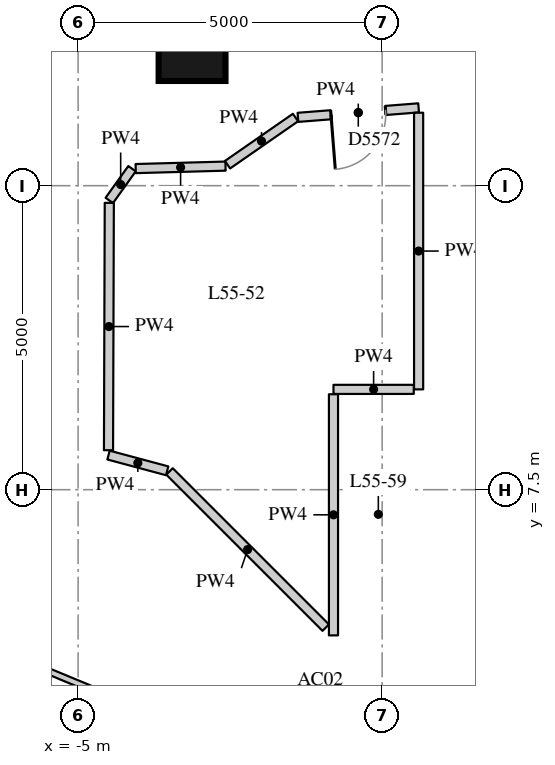
"""IFC4 building model, lengths in metres.
Left out: names, types, materials, properties, quantities, classifications, styles, units other than length and angle.
Written with IfcOpenShell. Run it as: python <this file> out.ifc"""

import sys

from ifc_helpers import new_model, si_unit, direction, frame, frame_2d, origin, origin_2d, place, context, subcontext, project, spatial, rectangle, extrude, element, fill, save


model = new_model("IFC4")
c1 = context("Model", 3, precision=1e-05, world=origin(), true_north=direction((0.0, 1.0)))
c2 = subcontext(c1, "Body", "Model", "MODEL_VIEW")
j1 = project(units=[si_unit("LENGTHUNIT", "METRE"), si_unit("PLANEANGLEUNIT", "RADIAN")], contexts=[c1])
p1 = place(None, origin())
s1 = spatial("IfcSite", under=j1, at=p1, CompositionType="ELEMENT")
p2 = place(p1, origin())
s2 = spatial("IfcBuilding", under=s1, at=p2, CompositionType="ELEMENT")
p3 = place(p2, frame((0.0, 0.0, 195.8)))
s3 = spatial("IfcBuildingStorey", under=s2, at=p3, CompositionType="ELEMENT", Elevation=195.8)
p4 = place(p3, frame((-3.126, 14.772, 0.0), z_axis=(0.0, 0.0, 1.0), x_axis=(1.0, 0.0, 0.0)))
e1 = element("IfcColumn", 1, at=p4, inside=s3, PredefinedType="COLUMN", context=c2, shape_type="SweptSolid", body=[
    extrude(rectangle(XDim=1.1, YDim=1.1, at=origin_2d()), origin(), (0.0, 0.0, 1.0), 3.3),
])
p5 = place(p3, frame((-4.487, 12.258, 0.0), z_axis=(0.0, 0.0, 1.0), x_axis=(0.582280364551, 0.812988054684, 0.0)))
e2 = element("IfcWall", 2, at=p5, inside=s3, PredefinedType="PARTITIONING", context=c2, shape_type="SweptSolid", body=[
    extrude(rectangle(XDim=0.642, YDim=0.15, at=frame_2d((0.321, 0.0))), origin(), (0.0, 0.0, 1.0), 3.02),
])
p6 = place(p3, frame((-4.053, 12.781, 0.0), z_axis=(0.0, 0.0, 1.0), x_axis=(0.999619372091, 0.027588239157, 0.0)))
e3 = element("IfcWall", 3, at=p6, inside=s3, PredefinedType="PARTITIONING", context=c2, shape_type="SweptSolid", body=[
    extrude(rectangle(XDim=1.478, YDim=0.15, at=frame_2d((0.739, 0.0))), origin(), (0.0, 0.0, 1.0), 3.02),
])
p7 = place(p3, frame((-2.543, 12.845, 0.0), z_axis=(0.0, 0.0, 1.0), x_axis=(0.821558970312, 0.570123546523, 0.0)))
e4 = element("IfcWall", 4, at=p7, inside=s3, PredefinedType="PARTITIONING", context=c2, shape_type="SweptSolid", body=[
    extrude(rectangle(XDim=1.361, YDim=0.15, at=frame_2d((0.681, 0.0))), origin(), (0.0, 0.0, 1.0), 3.02),
])
p8 = place(p3, frame((-1.385, 13.624, 0.0), z_axis=(0.0, 0.0, 1.0), x_axis=(0.996924678821, 0.078365711621, 0.0)))
e5 = element("IfcWall", 5, at=p8, inside=s3, PredefinedType="PARTITIONING", context=c2, shape_type="SweptSolid", body=[
    extrude(rectangle(XDim=1.991, YDim=0.15, at=frame_2d((0.995, 0.0))), origin(), (0.0, 0.0, 1.0), 3.02),
])
p9 = place(p8, frame((0.545, 0.0, 0.0)))
e6 = element("IfcOpeningElement", 6, at=p9, cuts=e5, PredefinedType="OPENING", context=c2, shape_type="SweptSolid", body=[
    extrude(rectangle(XDim=0.9, YDim=2.1, at=frame_2d((0.45, 1.05))), frame((0.0, 0.085, 0.0), z_axis=(0.0, -1.0, 0.0), x_axis=(1.0, 0.0, 0.0)), (0.0, 0.0, 1.0), 0.17),
])
p10 = place(p3, frame((0.6, 13.7, 0.0), z_axis=(0.0, 0.0, 1.0), x_axis=(0.0, -1.0, 0.0)))
e7 = element("IfcWall", 7, at=p10, inside=s3, PredefinedType="PARTITIONING", context=c2, shape_type="SweptSolid", body=[
    extrude(rectangle(XDim=4.55, YDim=0.15, at=frame_2d((2.275, 0.0))), origin(), (0.0, 0.0, 1.0), 3.02),
])
p11 = place(p3, frame((0.52, 9.15, 0.0), z_axis=(0.0, 0.0, 1.0), x_axis=(-1.0, 0.0, 0.0)))
e8 = element("IfcWall", 8, at=p11, inside=s3, PredefinedType="PARTITIONING", context=c2, shape_type="SweptSolid", body=[
    extrude(rectangle(XDim=1.32, YDim=0.15, at=frame_2d((0.66, 0.0))), origin(), (0.0, 0.0, 1.0), 3.02),
])
p12 = place(p3, frame((-0.8, 9.07, 0.0), z_axis=(0.0, 0.0, 1.0), x_axis=(0.0, -1.0, 0.0)))
e9 = element("IfcWall", 9, at=p12, inside=s3, PredefinedType="PARTITIONING", context=c2, shape_type="SweptSolid", body=[
    extrude(rectangle(XDim=3.966, YDim=0.15, at=frame_2d((1.983, 0.0))), origin(), (0.0, 0.0, 1.0), 3.02),
])
p13 = place(p3, frame((-0.927, 5.231, 0.0), z_axis=(0.0, 0.0, 1.0), x_axis=(-0.707106781187, 0.707106781187, 0.0)))
e10 = element("IfcWall", 10, at=p13, inside=s3, PredefinedType="PARTITIONING", context=c2, shape_type="SweptSolid", body=[
    extrude(rectangle(XDim=3.633, YDim=0.15, at=frame_2d((1.817, 0.0))), origin(), (0.0, 0.0, 1.0), 3.02),
])
p14 = place(p3, frame((-3.535, 7.811, 0.0), z_axis=(0.0, 0.0, 1.0), x_axis=(-0.965921867197, 0.258833820183, 0.0)))
e11 = element("IfcWall", 11, at=p14, inside=s3, PredefinedType="PARTITIONING", context=c2, shape_type="SweptSolid", body=[
    extrude(rectangle(XDim=0.999, YDim=0.15, at=frame_2d((0.5, 0.0))), origin(), (0.0, 0.0, 1.0), 3.02),
])
p15 = place(p3, frame((-4.5, 8.149, 0.0), z_axis=(0.0, 0.0, 1.0), x_axis=(0.003180492795, 0.99999494222, 0.0)))
e12 = element("IfcWall", 12, at=p15, inside=s3, PredefinedType="PARTITIONING", context=c2, shape_type="SweptSolid", body=[
    extrude(rectangle(XDim=4.068, YDim=0.15, at=frame_2d((2.034, 0.0))), origin(), (0.0, 0.0, 1.0), 3.02),
])
p16 = place(p3, frame((-8.0, 5.554, 0.0), z_axis=(0.0, 0.0, 1.0), x_axis=(0.923860025149, -0.382730523909, 0.0)))
e13 = element("IfcWall", 13, at=p16, inside=s3, PredefinedType="PARTITIONING", context=c2, shape_type="SweptSolid", body=[
    extrude(rectangle(XDim=4.251, YDim=0.1, at=frame_2d((2.125, 0.0))), origin(), (0.0, 0.0, 1.0), 3.02),
])
p17 = place(p9, origin())
e14 = element("IfcDoor", 14, at=p17, inside=s3, OperationType="SINGLE_SWING_RIGHT", PredefinedType="DOOR", context=c2, shape_type="SweptSolid", body=[
    extrude(rectangle(XDim=0.9, YDim=2.1, at=frame_2d((0.45, 1.05))), frame((0.0, 0.025, 0.0), z_axis=(0.0, -1.0, 0.0), x_axis=(1.0, 0.0, 0.0)), (0.0, 0.0, 1.0), 0.05),
])
fill(e6, e14)
save(model, sys.argv[1])
